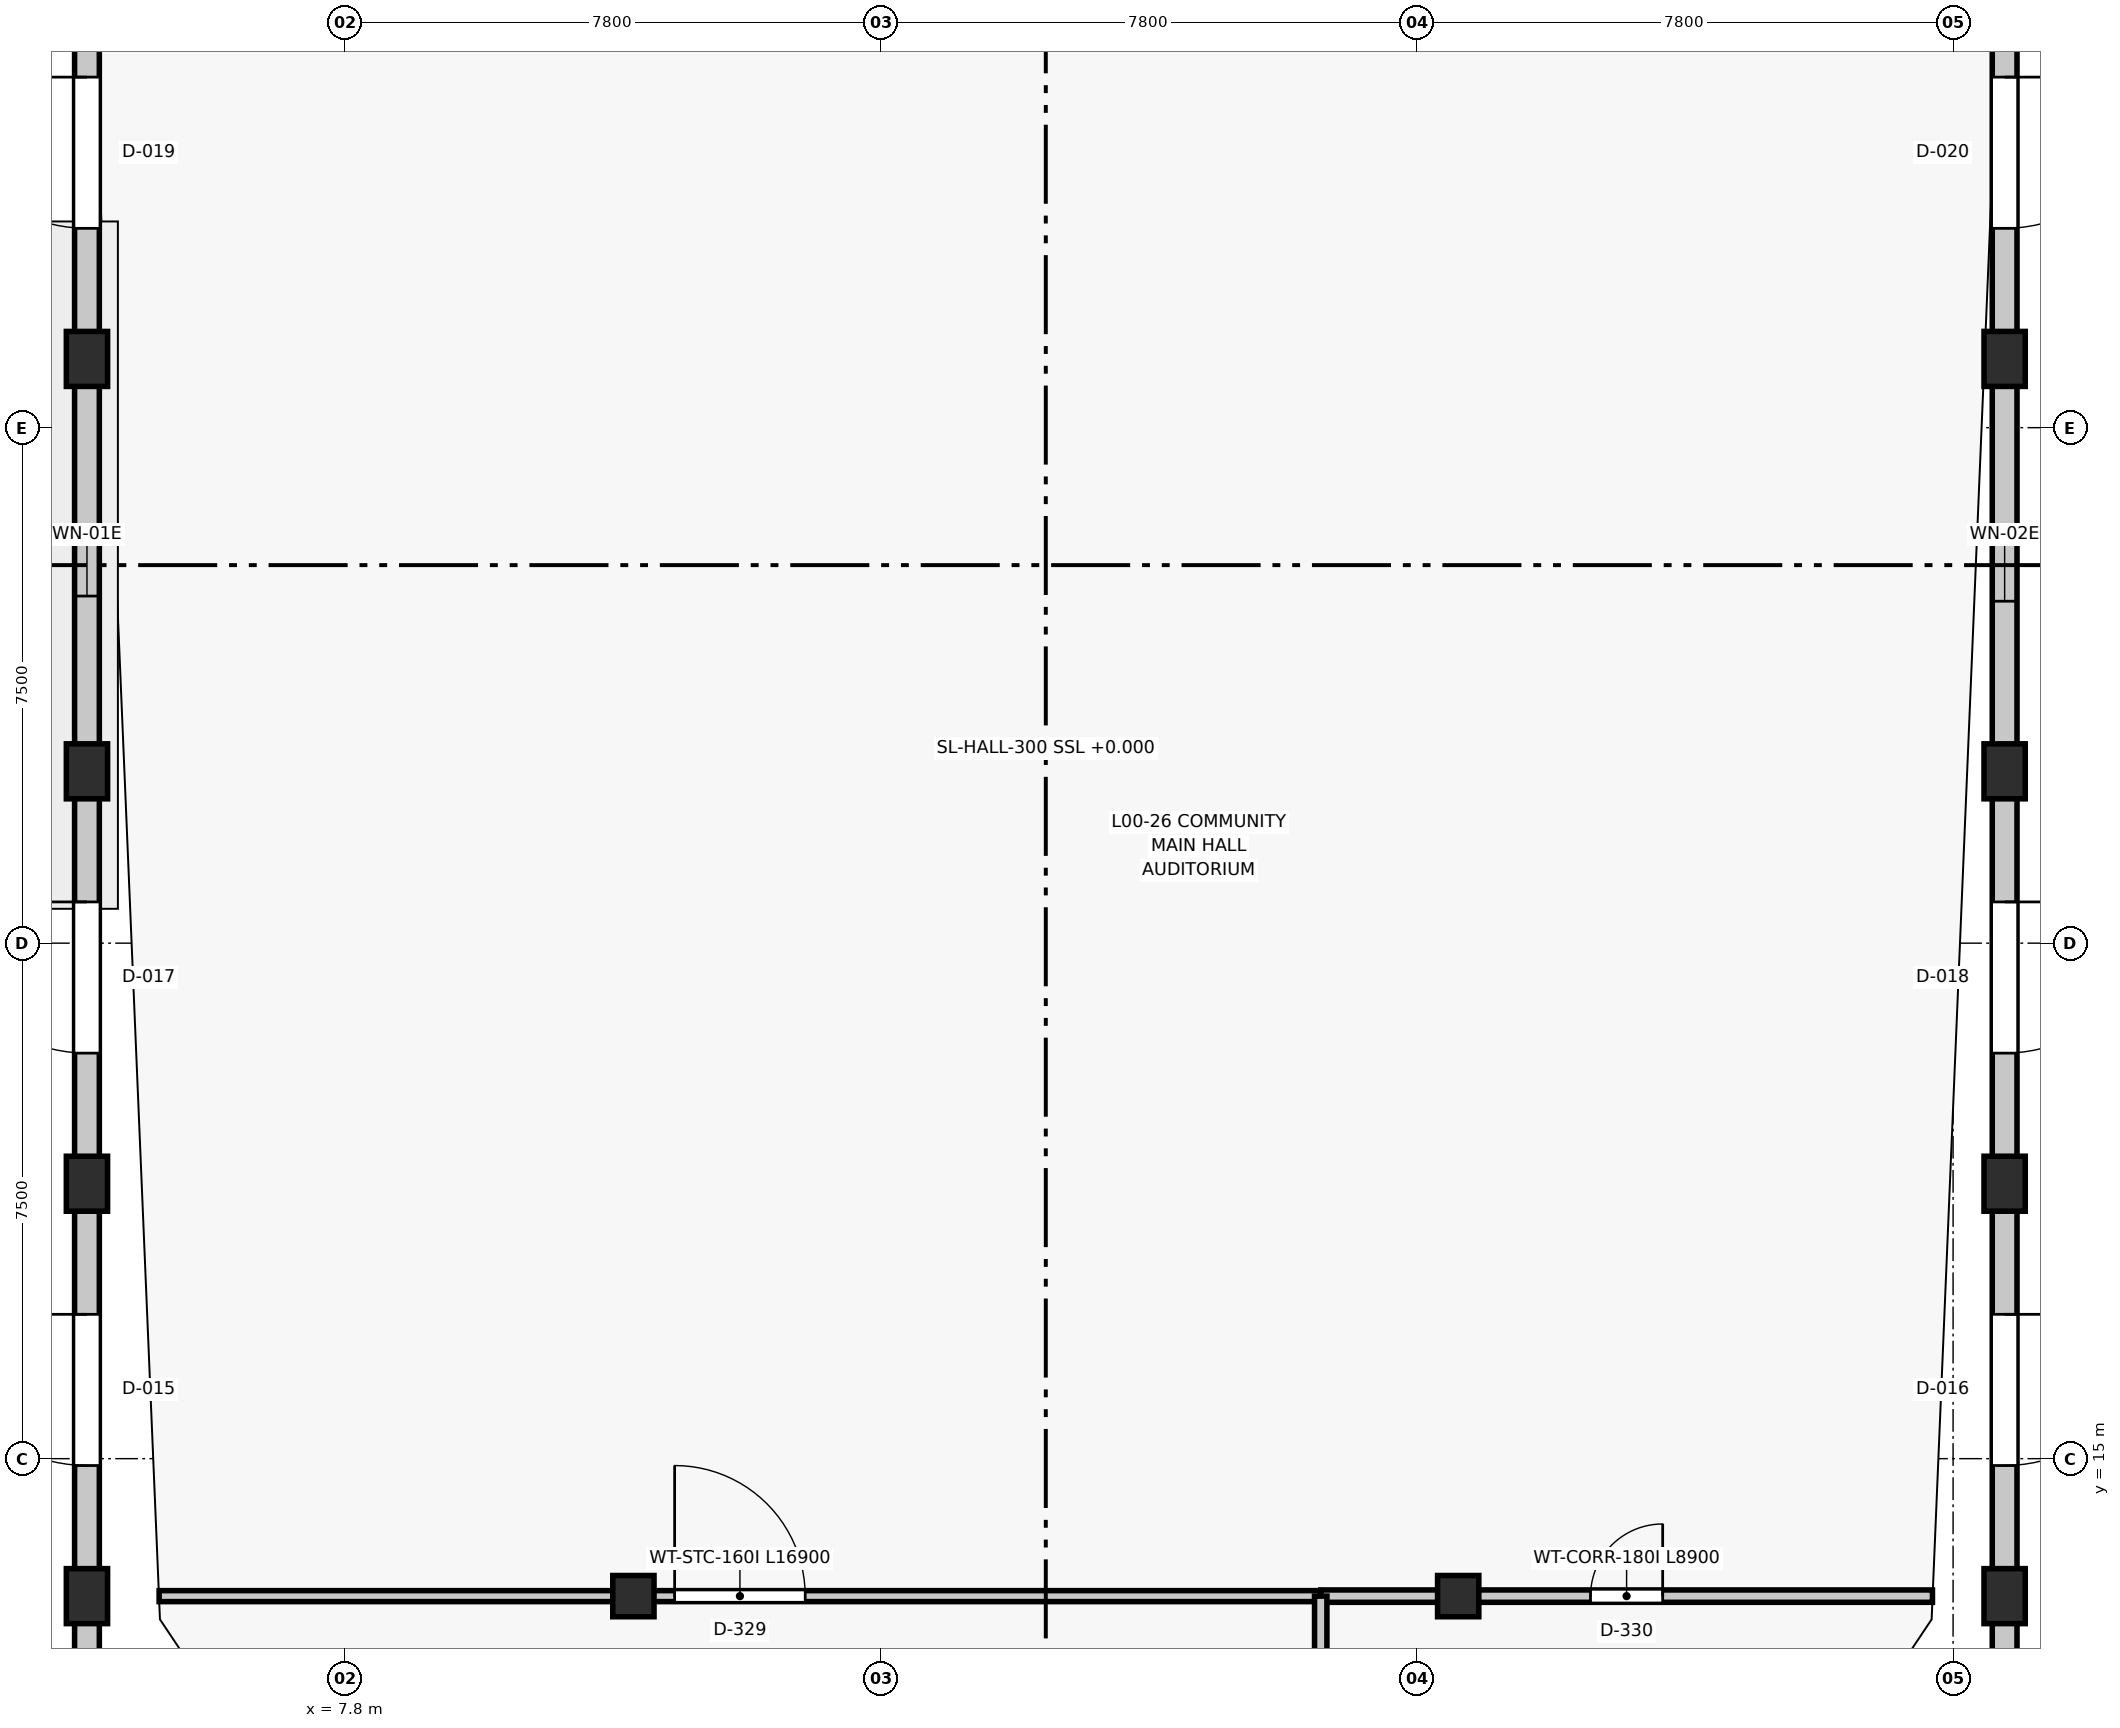
"""IFC4 building model, lengths in metres.
Left out: names, types, materials, properties, quantities, classifications, styles, units other than length and angle.
Written with IfcOpenShell. Run it as: python <this file> out.ifc"""

import sys

from ifc_helpers import new_model, si_unit, direction, frame, frame_2d, origin, origin_2d, place, context, subcontext, project, spatial, rectangle, extrude, element, fill, save


model = new_model("IFC4")
c1 = context("Model", 3, precision=1e-05, world=origin(), true_north=direction((0.0, 1.0)))
c2 = subcontext(c1, "Body", "Model", "MODEL_VIEW")
j1 = project(units=[si_unit("LENGTHUNIT", "METRE"), si_unit("PLANEANGLEUNIT", "RADIAN")], contexts=[c1])
p1 = place(None, origin())
s1 = spatial("IfcSite", under=j1, at=p1, CompositionType="ELEMENT")
p2 = place(p1, origin())
s2 = spatial("IfcBuilding", under=s1, at=p2, CompositionType="ELEMENT")
p3 = place(p2, origin())
s3 = spatial("IfcBuildingStorey", under=s2, at=p3, CompositionType="ELEMENT", Elevation=0.0)
for number, where, z_axis, x_axis in (
    (1, (12.0, 13.0, 0.0), (0.0, 0.0, 1.0), (1.0, 0.0, 0.0)),
    (2, (24.0, 13.0, 0.0), (0.0, 0.0, 1.0), (1.0, 0.0, 0.0)),
):
    element("IfcColumn", number, at=place(p3, frame(where, z_axis=z_axis, x_axis=x_axis)), inside=s3, PredefinedType="COLUMN", context=c2, shape_type="SweptSolid", body=[
        extrude(rectangle(XDim=0.6, YDim=0.6, at=origin_2d()), origin(), (0.0, 0.0, 1.0), 4.5),
    ])
for number, where, z_axis, x_axis in (
    (3, (31.95, 13.0, 0.0), (0.0, 0.0, 1.0), (1.0, 0.0, 0.0)),
    (4, (31.95, 19.0, 0.0), (0.0, 0.0, 1.0), (1.0, 0.0, 0.0)),
    (5, (31.95, 25.0, 0.0), (0.0, 0.0, 1.0), (1.0, 0.0, 0.0)),
    (6, (31.95, 31.0, 0.0), (0.0, 0.0, 1.0), (1.0, 0.0, 0.0)),
    (7, (4.05, 13.0, 0.0), (0.0, 0.0, 1.0), (1.0, 0.0, 0.0)),
    (8, (4.05, 19.0, 0.0), (0.0, 0.0, 1.0), (1.0, 0.0, 0.0)),
    (9, (4.05, 25.0, 0.0), (0.0, 0.0, 1.0), (1.0, 0.0, 0.0)),
    (10, (4.05, 31.0, 0.0), (0.0, 0.0, 1.0), (1.0, 0.0, 0.0)),
):
    element("IfcColumn", number, at=place(p3, frame(where, z_axis=z_axis, x_axis=x_axis)), inside=s3, PredefinedType="COLUMN", context=c2, shape_type="SweptSolid", body=[
        extrude(rectangle(XDim=0.6, YDim=0.8, at=origin_2d()), origin(), (0.0, 0.0, 1.0), 4.5),
    ])
p4 = place(p3, frame((4.05, 7.375, 0.0), z_axis=(0.0, 0.0, 1.0), x_axis=(0.0, 1.0, 0.0)))
e11 = element("IfcWall", 11, at=p4, inside=s3, PredefinedType="STANDARD", context=c2, shape_type="SweptSolid", body=[
    extrude(rectangle(XDim=5.25, YDim=0.36, at=frame_2d((2.625, 0.0))), origin(), (0.0, 0.0, 1.0), 3.345),
])
p5 = place(p4, frame((1.825, 0.0, 0.9)))
e12 = element("IfcOpeningElement", 12, at=p5, cuts=e11, PredefinedType="OPENING", context=c2, shape_type="SweptSolid", body=[
    extrude(rectangle(XDim=1.6, YDim=1.95, at=frame_2d((0.8, 0.975))), frame((0.0, 0.19, 0.0), z_axis=(0.0, -1.0, 0.0), x_axis=(1.0, 0.0, 0.0)), (0.0, 0.0, 1.0), 0.38),
])
p6 = place(p3, frame((31.95, 12.625, 0.0), z_axis=(0.0, 0.0, 1.0), x_axis=(0.0, -1.0, 0.0)))
e13 = element("IfcWall", 13, at=p6, inside=s3, PredefinedType="STANDARD", context=c2, shape_type="SweptSolid", body=[
    extrude(rectangle(XDim=5.25, YDim=0.36, at=frame_2d((2.625, 0.0))), origin(), (0.0, 0.0, 1.0), 3.345),
])
p7 = place(p6, frame((1.625, 0.0, 0.9)))
e14 = element("IfcOpeningElement", 14, at=p7, cuts=e13, PredefinedType="OPENING", context=c2, shape_type="SweptSolid", body=[
    extrude(rectangle(XDim=2.0, YDim=1.95, at=frame_2d((1.0, 0.975))), frame((0.0, 0.19, 0.0), z_axis=(0.0, -1.0, 0.0), x_axis=(1.0, 0.0, 0.0)), (0.0, 0.0, 1.0), 0.38),
])
p8 = place(p3, frame((4.05, 13.375, 0.0), z_axis=(0.0, 0.0, 1.0), x_axis=(0.0, 1.0, 0.0)))
e15 = element("IfcWall", 15, at=p8, inside=s3, PredefinedType="STANDARD", context=c2, shape_type="SweptSolid", body=[
    extrude(rectangle(XDim=5.25, YDim=0.36, at=frame_2d((2.625, 0.0))), origin(), (0.0, 0.0, 1.0), 3.345),
])
p9 = place(p8, frame((1.525, 0.0, 0.0)))
e16 = element("IfcOpeningElement", 16, at=p9, cuts=e15, PredefinedType="OPENING", context=c2, shape_type="SweptSolid", body=[
    extrude(rectangle(XDim=2.2, YDim=2.35, at=frame_2d((1.1, 1.175))), frame((0.0, 0.19, 0.0), z_axis=(0.0, -1.0, 0.0), x_axis=(1.0, 0.0, 0.0)), (0.0, 0.0, 1.0), 0.38),
])
p10 = place(p3, frame((31.95, 18.625, 0.0), z_axis=(0.0, 0.0, 1.0), x_axis=(0.0, -1.0, 0.0)))
e17 = element("IfcWall", 17, at=p10, inside=s3, PredefinedType="STANDARD", context=c2, shape_type="SweptSolid", body=[
    extrude(rectangle(XDim=5.25, YDim=0.36, at=frame_2d((2.625, 0.0))), origin(), (0.0, 0.0, 1.0), 3.345),
])
p11 = place(p10, frame((1.525, 0.0, 0.0)))
e18 = element("IfcOpeningElement", 18, at=p11, cuts=e17, PredefinedType="OPENING", context=c2, shape_type="SweptSolid", body=[
    extrude(rectangle(XDim=2.2, YDim=2.35, at=frame_2d((1.1, 1.175))), frame((0.0, 0.19, 0.0), z_axis=(0.0, -1.0, 0.0), x_axis=(1.0, 0.0, 0.0)), (0.0, 0.0, 1.0), 0.38),
])
p12 = place(p3, frame((4.05, 19.375, 0.0), z_axis=(0.0, 0.0, 1.0), x_axis=(0.0, 1.0, 0.0)))
e19 = element("IfcWall", 19, at=p12, inside=s3, PredefinedType="STANDARD", context=c2, shape_type="SweptSolid", body=[
    extrude(rectangle(XDim=5.25, YDim=0.36, at=frame_2d((2.625, 0.0))), origin(), (0.0, 0.0, 1.0), 3.345),
])
p13 = place(p12, frame((1.525, 0.0, 0.0)))
e20 = element("IfcOpeningElement", 20, at=p13, cuts=e19, PredefinedType="OPENING", context=c2, shape_type="SweptSolid", body=[
    extrude(rectangle(XDim=2.2, YDim=2.35, at=frame_2d((1.1, 1.175))), frame((0.0, 0.19, 0.0), z_axis=(0.0, -1.0, 0.0), x_axis=(1.0, 0.0, 0.0)), (0.0, 0.0, 1.0), 0.38),
])
p14 = place(p3, frame((31.95, 24.625, 0.0), z_axis=(0.0, 0.0, 1.0), x_axis=(0.0, -1.0, 0.0)))
e21 = element("IfcWall", 21, at=p14, inside=s3, PredefinedType="STANDARD", context=c2, shape_type="SweptSolid", body=[
    extrude(rectangle(XDim=5.25, YDim=0.36, at=frame_2d((2.625, 0.0))), origin(), (0.0, 0.0, 1.0), 3.345),
])
p15 = place(p14, frame((1.525, 0.0, 0.0)))
e22 = element("IfcOpeningElement", 22, at=p15, cuts=e21, PredefinedType="OPENING", context=c2, shape_type="SweptSolid", body=[
    extrude(rectangle(XDim=2.2, YDim=2.35, at=frame_2d((1.1, 1.175))), frame((0.0, 0.19, 0.0), z_axis=(0.0, -1.0, 0.0), x_axis=(1.0, 0.0, 0.0)), (0.0, 0.0, 1.0), 0.38),
])
p16 = place(p3, frame((4.05, 25.375, 0.0), z_axis=(0.0, 0.0, 1.0), x_axis=(0.0, 1.0, 0.0)))
e23 = element("IfcWall", 23, at=p16, inside=s3, PredefinedType="STANDARD", context=c2, shape_type="SweptSolid", body=[
    extrude(rectangle(XDim=5.25, YDim=0.36, at=frame_2d((2.625, 0.0))), origin(), (0.0, 0.0, 1.0), 3.345),
])
p17 = place(p16, frame((2.175, 0.0, 0.9)))
e24 = element("IfcOpeningElement", 24, at=p17, cuts=e23, PredefinedType="OPENING", context=c2, shape_type="SweptSolid", body=[
    extrude(rectangle(XDim=0.9, YDim=0.9, at=frame_2d((0.45, 0.45))), frame((0.0, 0.19, 0.0), z_axis=(0.0, -1.0, 0.0), x_axis=(1.0, 0.0, 0.0)), (0.0, 0.0, 1.0), 0.38),
])
p18 = place(p3, frame((31.95, 30.625, 0.0), z_axis=(0.0, 0.0, 1.0), x_axis=(0.0, -1.0, 0.0)))
e25 = element("IfcWall", 25, at=p18, inside=s3, PredefinedType="STANDARD", context=c2, shape_type="SweptSolid", body=[
    extrude(rectangle(XDim=5.25, YDim=0.36, at=frame_2d((2.625, 0.0))), origin(), (0.0, 0.0, 1.0), 3.345),
])
p19 = place(p18, frame((2.1, 0.0, 0.9)))
e26 = element("IfcOpeningElement", 26, at=p19, cuts=e25, PredefinedType="OPENING", context=c2, shape_type="SweptSolid", body=[
    extrude(rectangle(XDim=1.05, YDim=1.05, at=frame_2d((0.525, 0.525))), frame((0.0, 0.19, 0.0), z_axis=(0.0, -1.0, 0.0), x_axis=(1.0, 0.0, 0.0)), (0.0, 0.0, 1.0), 0.38),
])
p20 = place(p3, frame((4.05, 31.375, 0.0), z_axis=(0.0, 0.0, 1.0), x_axis=(0.0, 1.0, 0.0)))
e27 = element("IfcWall", 27, at=p20, inside=s3, PredefinedType="STANDARD", context=c2, shape_type="SweptSolid", body=[
    extrude(rectangle(XDim=5.25, YDim=0.36, at=frame_2d((2.625, 0.0))), origin(), (0.0, 0.0, 1.0), 3.345),
])
p21 = place(p20, frame((1.525, 0.0, 0.0)))
e28 = element("IfcOpeningElement", 28, at=p21, cuts=e27, PredefinedType="OPENING", context=c2, shape_type="SweptSolid", body=[
    extrude(rectangle(XDim=2.2, YDim=2.35, at=frame_2d((1.1, 1.175))), frame((0.0, 0.19, 0.0), z_axis=(0.0, -1.0, 0.0), x_axis=(1.0, 0.0, 0.0)), (0.0, 0.0, 1.0), 0.38),
])
p22 = place(p3, frame((31.95, 36.625, 0.0), z_axis=(0.0, 0.0, 1.0), x_axis=(0.0, -1.0, 0.0)))
e29 = element("IfcWall", 29, at=p22, inside=s3, PredefinedType="STANDARD", context=c2, shape_type="SweptSolid", body=[
    extrude(rectangle(XDim=5.25, YDim=0.36, at=frame_2d((2.625, 0.0))), origin(), (0.0, 0.0, 1.0), 3.345),
])
p23 = place(p22, frame((1.525, 0.0, 0.0)))
e30 = element("IfcOpeningElement", 30, at=p23, cuts=e29, PredefinedType="OPENING", context=c2, shape_type="SweptSolid", body=[
    extrude(rectangle(XDim=2.2, YDim=2.35, at=frame_2d((1.1, 1.175))), frame((0.0, 0.19, 0.0), z_axis=(0.0, -1.0, 0.0), x_axis=(1.0, 0.0, 0.0)), (0.0, 0.0, 1.0), 0.38),
])
p24 = place(p3, frame((5.1, 13.0, 0.0), z_axis=(0.0, 0.0, 1.0), x_axis=(1.0, 0.0, 0.0)))
e31 = element("IfcWall", 31, at=p24, inside=s3, PredefinedType="PARTITIONING", context=c2, shape_type="SweptSolid", body=[
    extrude(rectangle(XDim=16.9, YDim=0.16, at=frame_2d((8.45, 0.0))), origin(), (0.0, 0.0, 1.0), 3.445),
])
p25 = place(p24, frame((7.5, 0.0, 0.0)))
e32 = element("IfcOpeningElement", 32, at=p25, cuts=e31, PredefinedType="OPENING", context=c2, shape_type="SweptSolid", body=[
    extrude(rectangle(XDim=1.9, YDim=2.25, at=frame_2d((0.95, 1.125))), frame((0.0, 0.09, 0.0), z_axis=(0.0, -1.0, 0.0), x_axis=(1.0, 0.0, 0.0)), (0.0, 0.0, 1.0), 0.18),
])
p26 = place(p3, frame((22.0, 13.0, 0.0), z_axis=(0.0, 0.0, 1.0), x_axis=(1.0, 0.0, 0.0)))
e33 = element("IfcWall", 33, at=p26, inside=s3, PredefinedType="PARTITIONING", context=c2, shape_type="SweptSolid", body=[
    extrude(rectangle(XDim=8.9, YDim=0.18, at=frame_2d((4.45, 0.0))), origin(), (0.0, 0.0, 1.0), 3.445),
])
p27 = place(p26, frame((3.925, 0.0, 0.0)))
e34 = element("IfcOpeningElement", 34, at=p27, cuts=e33, PredefinedType="OPENING", context=c2, shape_type="SweptSolid", body=[
    extrude(rectangle(XDim=1.05, YDim=2.1, at=frame_2d((0.525, 1.05))), frame((0.0, 0.1, 0.0), z_axis=(0.0, -1.0, 0.0), x_axis=(1.0, 0.0, 0.0)), (0.0, 0.0, 1.0), 0.2),
])
p28 = place(p3, frame((22.0, 5.2, 0.0), z_axis=(0.0, 0.0, 1.0), x_axis=(0.0, 1.0, 0.0)))
e35 = element("IfcWall", 35, at=p28, inside=s3, PredefinedType="PARTITIONING", context=c2, shape_type="SweptSolid", body=[
    extrude(rectangle(XDim=7.8, YDim=0.18, at=frame_2d((3.9, 0.0))), origin(), (0.0, 0.0, 1.0), 4.255),
])
p29 = place(p28, frame((3.425, 0.0, 0.0)))
e36 = element("IfcOpeningElement", 36, at=p29, cuts=e35, PredefinedType="OPENING", context=c2, shape_type="SweptSolid", body=[
    extrude(rectangle(XDim=0.95, YDim=2.1, at=frame_2d((0.475, 1.05))), frame((0.0, 0.1, 0.0), z_axis=(0.0, -1.0, 0.0), x_axis=(1.0, 0.0, 0.0)), (0.0, 0.0, 1.0), 0.2),
])
p30 = place(p9, origin())
e37 = element("IfcDoor", 37, at=p30, inside=s3, OperationType="SINGLE_SWING_RIGHT", PredefinedType="DOOR", context=c2, shape_type="SweptSolid", body=[
    extrude(rectangle(XDim=2.2, YDim=2.35, at=frame_2d((1.1, 1.175))), frame((0.0, 0.025, 0.0), z_axis=(0.0, -1.0, 0.0), x_axis=(1.0, 0.0, 0.0)), (0.0, 0.0, 1.0), 0.05),
])
fill(e16, e37)
p31 = place(p11, origin())
e38 = element("IfcDoor", 38, at=p31, inside=s3, OperationType="SINGLE_SWING_LEFT", PredefinedType="DOOR", context=c2, shape_type="SweptSolid", body=[
    extrude(rectangle(XDim=2.2, YDim=2.35, at=frame_2d((1.1, 1.175))), frame((0.0, 0.025, 0.0), z_axis=(0.0, -1.0, 0.0), x_axis=(1.0, 0.0, 0.0)), (0.0, 0.0, 1.0), 0.05),
])
fill(e18, e38)
p32 = place(p13, origin())
e39 = element("IfcDoor", 39, at=p32, inside=s3, OperationType="SINGLE_SWING_RIGHT", PredefinedType="DOOR", context=c2, shape_type="SweptSolid", body=[
    extrude(rectangle(XDim=2.2, YDim=2.35, at=frame_2d((1.1, 1.175))), frame((0.0, 0.025, 0.0), z_axis=(0.0, -1.0, 0.0), x_axis=(1.0, 0.0, 0.0)), (0.0, 0.0, 1.0), 0.05),
])
fill(e20, e39)
p33 = place(p15, origin())
e40 = element("IfcDoor", 40, at=p33, inside=s3, OperationType="SINGLE_SWING_LEFT", PredefinedType="DOOR", context=c2, shape_type="SweptSolid", body=[
    extrude(rectangle(XDim=2.2, YDim=2.35, at=frame_2d((1.1, 1.175))), frame((0.0, 0.025, 0.0), z_axis=(0.0, -1.0, 0.0), x_axis=(1.0, 0.0, 0.0)), (0.0, 0.0, 1.0), 0.05),
])
fill(e22, e40)
p34 = place(p17, origin())
e41 = element("IfcWindow", 41, at=p34, inside=s3, PartitioningType="SINGLE_PANEL", PredefinedType="WINDOW", context=c2, shape_type="SweptSolid", body=[
    extrude(rectangle(XDim=0.9, YDim=0.9, at=frame_2d((0.45, 0.45))), frame((0.0, 0.03, 0.0), z_axis=(0.0, -1.0, 0.0), x_axis=(1.0, 0.0, 0.0)), (0.0, 0.0, 1.0), 0.06),
])
fill(e24, e41)
p35 = place(p19, origin())
e42 = element("IfcWindow", 42, at=p35, inside=s3, PartitioningType="SINGLE_PANEL", PredefinedType="WINDOW", context=c2, shape_type="SweptSolid", body=[
    extrude(rectangle(XDim=1.05, YDim=1.05, at=frame_2d((0.525, 0.525))), frame((0.0, 0.03, 0.0), z_axis=(0.0, -1.0, 0.0), x_axis=(1.0, 0.0, 0.0)), (0.0, 0.0, 1.0), 0.06),
])
fill(e26, e42)
p36 = place(p21, origin())
e43 = element("IfcDoor", 43, at=p36, inside=s3, OperationType="SINGLE_SWING_RIGHT", PredefinedType="DOOR", context=c2, shape_type="SweptSolid", body=[
    extrude(rectangle(XDim=2.2, YDim=2.35, at=frame_2d((1.1, 1.175))), frame((0.0, 0.025, 0.0), z_axis=(0.0, -1.0, 0.0), x_axis=(1.0, 0.0, 0.0)), (0.0, 0.0, 1.0), 0.05),
])
fill(e28, e43)
p37 = place(p23, origin())
e44 = element("IfcDoor", 44, at=p37, inside=s3, OperationType="SINGLE_SWING_LEFT", PredefinedType="DOOR", context=c2, shape_type="SweptSolid", body=[
    extrude(rectangle(XDim=2.2, YDim=2.35, at=frame_2d((1.1, 1.175))), frame((0.0, 0.025, 0.0), z_axis=(0.0, -1.0, 0.0), x_axis=(1.0, 0.0, 0.0)), (0.0, 0.0, 1.0), 0.05),
])
fill(e30, e44)
p38 = place(p25, origin())
e45 = element("IfcDoor", 45, at=p38, inside=s3, OperationType="SINGLE_SWING_LEFT", PredefinedType="DOOR", context=c2, shape_type="SweptSolid", body=[
    extrude(rectangle(XDim=1.9, YDim=2.25, at=frame_2d((0.95, 1.125))), frame((0.0, 0.025, 0.0), z_axis=(0.0, -1.0, 0.0), x_axis=(1.0, 0.0, 0.0)), (0.0, 0.0, 1.0), 0.05),
])
fill(e32, e45)
p39 = place(p27, origin())
e46 = element("IfcDoor", 46, at=p39, inside=s3, OperationType="SINGLE_SWING_RIGHT", PredefinedType="DOOR", context=c2, shape_type="SweptSolid", body=[
    extrude(rectangle(XDim=1.05, YDim=2.1, at=frame_2d((0.525, 1.05))), frame((0.0, 0.025, 0.0), z_axis=(0.0, -1.0, 0.0), x_axis=(1.0, 0.0, 0.0)), (0.0, 0.0, 1.0), 0.05),
])
fill(e34, e46)
save(model, sys.argv[1])
